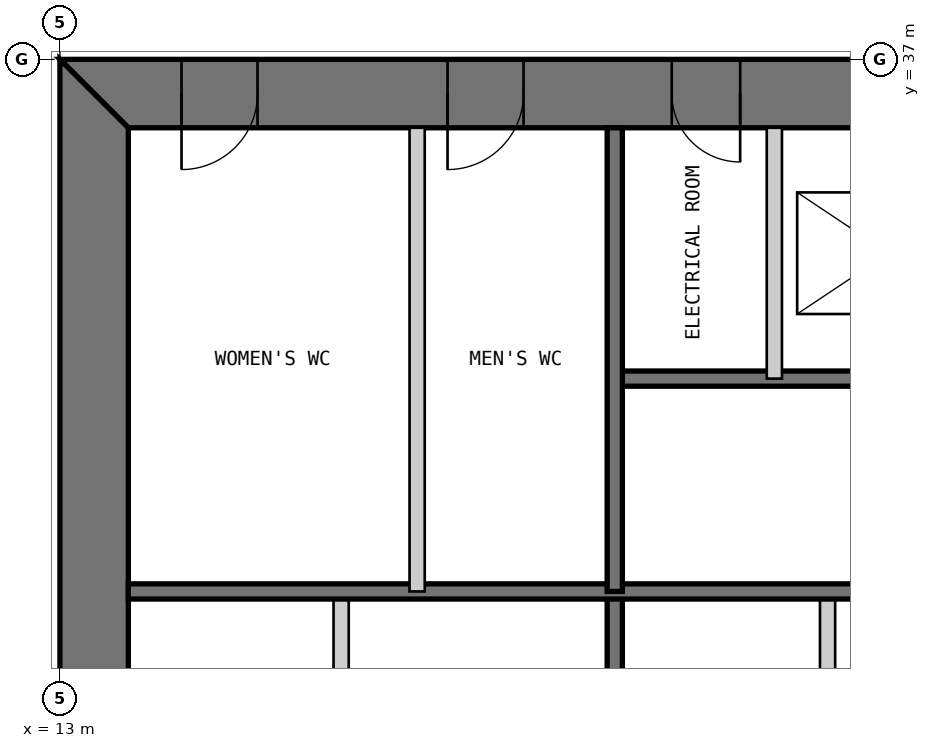
"""IFC4 building model, lengths in metres.
Left out: names, types, materials, properties, quantities, classifications, styles, units other than length and angle.
Written with IfcOpenShell. Run it as: python <this file> out.ifc"""

import sys

from ifc_helpers import new_model, si_unit, direction, frame, frame_2d, origin, place, context, subcontext, project, spatial, polyline, rectangle, outline, extrude, element, fill, save


model = new_model("IFC4")
c1 = context("Model", 3, precision=1e-05, world=origin(), true_north=direction((0.0, 1.0)))
c2 = subcontext(c1, "Body", "Model", "MODEL_VIEW")
j1 = project(units=[si_unit("LENGTHUNIT", "METRE"), si_unit("PLANEANGLEUNIT", "RADIAN")], contexts=[c1])
p1 = place(None, origin())
s1 = spatial("IfcSite", under=j1, at=p1, CompositionType="ELEMENT")
p2 = place(p1, origin())
s2 = spatial("IfcBuilding", under=s1, at=p2, CompositionType="ELEMENT")
p3 = place(p2, frame((0.0, 0.0, 290.0)))
s3 = spatial("IfcBuildingStorey", under=s2, at=p3, CompositionType="ELEMENT", Elevation=290.0)
p4 = place(p3, frame((37.0, 36.55, 0.0), z_axis=(0.0, 0.0, 1.0), x_axis=(-1.0, 0.0, 0.0)))
e1 = element("IfcWall", 1, at=p4, inside=s3, PredefinedType="SHEAR", context=c2, shape_type="SweptSolid", body=[
    extrude(outline(polyline([(0.0, -0.45), (24.0, -0.45), (23.1, 0.45), (0.9, 0.45), (0.0, -0.45)])), origin(), (0.0, 0.0, 1.0), 3.4),
])
p5 = place(p4, frame((4.9, 0.0, 0.0)))
e2 = element("IfcOpeningElement", 2, at=p5, cuts=e1, PredefinedType="OPENING", context=c2, shape_type="SweptSolid", body=[
    extrude(rectangle(XDim=1.0, YDim=2.2, at=frame_2d((0.5, 1.1))), frame((0.0, 0.46, 0.0), z_axis=(0.0, -1.0, 0.0), x_axis=(1.0, 0.0, 0.0)), (0.0, 0.0, 1.0), 0.92),
])
p6 = place(p4, frame((8.9, 0.0, 0.0)))
e3 = element("IfcOpeningElement", 3, at=p6, cuts=e1, PredefinedType="OPENING", context=c2, shape_type="SweptSolid", body=[
    extrude(rectangle(XDim=1.1, YDim=2.2, at=frame_2d((0.55, 1.1))), frame((0.0, 0.46, 0.0), z_axis=(0.0, -1.0, 0.0), x_axis=(1.0, 0.0, 0.0)), (0.0, 0.0, 1.0), 0.92),
])
p7 = place(p4, frame((15.05, 0.0, 0.0)))
e4 = element("IfcOpeningElement", 4, at=p7, cuts=e1, PredefinedType="OPENING", context=c2, shape_type="SweptSolid", body=[
    extrude(rectangle(XDim=0.9, YDim=2.2, at=frame_2d((0.45, 1.1))), frame((0.0, 0.46, 0.0), z_axis=(0.0, -1.0, 0.0), x_axis=(1.0, 0.0, 0.0)), (0.0, 0.0, 1.0), 0.92),
])
p8 = place(p4, frame((17.9, 0.0, 0.0)))
e5 = element("IfcOpeningElement", 5, at=p8, cuts=e1, PredefinedType="OPENING", context=c2, shape_type="SweptSolid", body=[
    extrude(rectangle(XDim=1.0, YDim=2.2, at=frame_2d((0.5, 1.1))), frame((0.0, 0.46, 0.0), z_axis=(0.0, -1.0, 0.0), x_axis=(1.0, 0.0, 0.0)), (0.0, 0.0, 1.0), 0.92),
])
p9 = place(p4, frame((21.4, 0.0, 0.0)))
e6 = element("IfcOpeningElement", 6, at=p9, cuts=e1, PredefinedType="OPENING", context=c2, shape_type="SweptSolid", body=[
    extrude(rectangle(XDim=1.0, YDim=2.2, at=frame_2d((0.5, 1.1))), frame((0.0, 0.46, 0.0), z_axis=(0.0, -1.0, 0.0), x_axis=(1.0, 0.0, 0.0)), (0.0, 0.0, 1.0), 0.92),
])
p10 = place(p3, frame((13.45, 36.1, 0.0), z_axis=(0.0, 0.0, 1.0), x_axis=(0.0, -1.0, 0.0)))
e7 = element("IfcWall", 7, at=p10, inside=s3, PredefinedType="SHEAR", context=c2, shape_type="SweptSolid", body=[
    extrude(outline(polyline([(-0.9, -0.45), (23.1, -0.45), (22.2, 0.45), (0.0, 0.45), (-0.9, -0.45)])), origin(), (0.0, 0.0, 1.0), 3.4),
])
p11 = place(p10, frame((20.2, 0.0, 0.0)))
e8 = element("IfcOpeningElement", 8, at=p11, cuts=e7, PredefinedType="OPENING", context=c2, shape_type="SweptSolid", body=[
    extrude(rectangle(XDim=1.0, YDim=2.2, at=frame_2d((0.5, 1.1))), frame((0.0, 0.46, 0.0), z_axis=(0.0, -1.0, 0.0), x_axis=(1.0, 0.0, 0.0)), (0.0, 0.0, 1.0), 0.92),
])
p12 = place(p10, frame((17.25, 0.0, 0.0)))
e9 = element("IfcOpeningElement", 9, at=p12, cuts=e7, PredefinedType="OPENING", context=c2, shape_type="SweptSolid", body=[
    extrude(rectangle(XDim=0.9, YDim=2.2, at=frame_2d((0.45, 1.1))), frame((0.0, 0.46, 0.0), z_axis=(0.0, -1.0, 0.0), x_axis=(1.0, 0.0, 0.0)), (0.0, 0.0, 1.0), 0.92),
])
p13 = place(p3, frame((16.7, 13.9, 0.0), z_axis=(0.0, 0.0, 1.0), x_axis=(0.0, 1.0, 0.0)))
e10 = element("IfcWall", 10, at=p13, inside=s3, PredefinedType="PARTITIONING", context=c2, shape_type="SweptSolid", body=[
    extrude(rectangle(XDim=16.1, YDim=0.2, at=frame_2d((8.05, 0.0))), origin(), (0.0, 0.0, 1.0), 3.2),
])
p14 = place(p13, frame((7.95, 0.0, 0.0)))
e11 = element("IfcOpeningElement", 11, at=p14, cuts=e10, PredefinedType="OPENING", context=c2, shape_type="SweptSolid", body=[
    extrude(rectangle(XDim=0.9, YDim=2.2, at=frame_2d((0.45, 1.1))), frame((0.0, 0.11, 0.0), z_axis=(0.0, -1.0, 0.0), x_axis=(1.0, 0.0, 0.0)), (0.0, 0.0, 1.0), 0.22),
])
p15 = place(p13, frame((12.9, 0.0, 0.0)))
e12 = element("IfcOpeningElement", 12, at=p15, cuts=e10, PredefinedType="OPENING", context=c2, shape_type="SweptSolid", body=[
    extrude(rectangle(XDim=0.9, YDim=2.2, at=frame_2d((0.45, 1.1))), frame((0.0, 0.11, 0.0), z_axis=(0.0, -1.0, 0.0), x_axis=(1.0, 0.0, 0.0)), (0.0, 0.0, 1.0), 0.22),
])
p16 = place(p3, frame((20.3, 13.9, 0.0), z_axis=(0.0, 0.0, 1.0), x_axis=(0.0, 1.0, 0.0)))
e13 = element("IfcWall", 13, at=p16, inside=s3, PredefinedType="SOLIDWALL", context=c2, shape_type="SweptSolid", body=[
    extrude(rectangle(XDim=16.1, YDim=0.2, at=frame_2d((8.05, 0.0))), origin(), (0.0, 0.0, 1.0), 3.2),
])
p17 = place(p16, frame((10.65, 0.0, 0.0)))
e14 = element("IfcOpeningElement", 14, at=p17, cuts=e13, PredefinedType="OPENING", context=c2, shape_type="SweptSolid", body=[
    extrude(rectangle(XDim=0.9, YDim=2.2, at=frame_2d((0.45, 1.1))), frame((0.0, 0.11, 0.0), z_axis=(0.0, -1.0, 0.0), x_axis=(1.0, 0.0, 0.0)), (0.0, 0.0, 1.0), 0.22),
])
p18 = place(p3, frame((23.1, 20.0, 0.0), z_axis=(0.0, 0.0, 1.0), x_axis=(0.0, 1.0, 0.0)))
e15 = element("IfcWall", 15, at=p18, inside=s3, PredefinedType="PARTITIONING", context=c2, shape_type="SweptSolid", body=[
    extrude(rectangle(XDim=10.0, YDim=0.2, at=frame_2d((5.0, 0.0))), origin(), (0.0, 0.0, 1.0), 3.2),
])
p19 = place(p3, frame((29.7, 32.8, 0.0), z_axis=(0.0, 0.0, 1.0), x_axis=(-1.0, 0.0, 0.0)))
e16 = element("IfcWall", 16, at=p19, inside=s3, PredefinedType="SOLIDWALL", context=c2, shape_type="SweptSolid", body=[
    extrude(rectangle(XDim=9.4, YDim=0.2, at=frame_2d((4.7, 0.0))), origin(), (0.0, 0.0, 1.0), 3.2),
])
p20 = place(p19, frame((0.25, 0.0, 0.0)))
e17 = element("IfcOpeningElement", 17, at=p20, cuts=e16, PredefinedType="OPENING", context=c2, shape_type="SweptSolid", body=[
    extrude(rectangle(XDim=1.0, YDim=2.2, at=frame_2d((0.5, 1.1))), frame((0.0, 0.11, 0.0), z_axis=(0.0, -1.0, 0.0), x_axis=(1.0, 0.0, 0.0)), (0.0, 0.0, 1.0), 0.22),
])
p21 = place(p3, frame((29.7, 30.0, 0.0), z_axis=(0.0, 0.0, 1.0), x_axis=(-1.0, 0.0, 0.0)))
e18 = element("IfcWall", 18, at=p21, inside=s3, PredefinedType="SOLIDWALL", context=c2, shape_type="SweptSolid", body=[
    extrude(rectangle(XDim=15.8, YDim=0.2, at=frame_2d((7.9, 0.0))), origin(), (0.0, 0.0, 1.0), 3.2),
])
p22 = place(p3, frame((22.4, 36.1, 0.0), z_axis=(0.0, 0.0, 1.0), x_axis=(0.0, -1.0, 0.0)))
e19 = element("IfcWall", 19, at=p22, inside=s3, PredefinedType="PARTITIONING", context=c2, shape_type="SweptSolid", body=[
    extrude(rectangle(XDim=3.3, YDim=0.2, at=frame_2d((1.65, 0.0))), origin(), (0.0, 0.0, 1.0), 3.2),
])
p23 = place(p3, frame((20.3, 36.1, 0.0), z_axis=(0.0, 0.0, 1.0), x_axis=(0.0, -1.0, 0.0)))
e20 = element("IfcWall", 20, at=p23, inside=s3, PredefinedType="SOLIDWALL", context=c2, shape_type="SweptSolid", body=[
    extrude(rectangle(XDim=6.1, YDim=0.2, at=frame_2d((3.05, 0.0))), origin(), (0.0, 0.0, 1.0), 3.2),
])
p24 = place(p3, frame((17.7, 36.1, 0.0), z_axis=(0.0, 0.0, 1.0), x_axis=(0.0, -1.0, 0.0)))
e21 = element("IfcWall", 21, at=p24, inside=s3, PredefinedType="PARTITIONING", context=c2, shape_type="SweptSolid", body=[
    extrude(rectangle(XDim=6.1, YDim=0.2, at=frame_2d((3.05, 0.0))), origin(), (0.0, 0.0, 1.0), 3.2),
])
p25 = place(p7, origin())
e22 = element("IfcDoor", 22, at=p25, inside=s3, OperationType="SINGLE_SWING_LEFT", PredefinedType="DOOR", context=c2, shape_type="SweptSolid", body=[
    extrude(rectangle(XDim=0.9, YDim=2.2, at=frame_2d((0.45, 1.1))), frame((0.0, 0.025, 0.0), z_axis=(0.0, -1.0, 0.0), x_axis=(1.0, 0.0, 0.0)), (0.0, 0.0, 1.0), 0.05),
    extrude(outline(polyline([(0.0, 0.0), (0.04, 0.0), (0.04, 2.16), (0.86, 2.16), (0.86, 0.0), (0.9, 0.0), (0.9, 2.2), (0.0, 2.2), (0.0, 0.0)])), frame((0.0, 0.3, 0.0), z_axis=(0.0, -1.0, 0.0), x_axis=(1.0, 0.0, 0.0)), (0.0, 0.0, 1.0), 0.6),
])
fill(e4, e22)
p26 = place(p8, origin())
e23 = element("IfcDoor", 23, at=p26, inside=s3, OperationType="SINGLE_SWING_RIGHT", PredefinedType="DOOR", context=c2, shape_type="SweptSolid", body=[
    extrude(rectangle(XDim=1.0, YDim=2.2, at=frame_2d((0.5, 1.1))), frame((0.0, 0.025, 0.0), z_axis=(0.0, -1.0, 0.0), x_axis=(1.0, 0.0, 0.0)), (0.0, 0.0, 1.0), 0.05),
    extrude(outline(polyline([(0.0, 0.0), (0.04, 0.0), (0.04, 2.16), (0.96, 2.16), (0.96, 0.0), (1.0, 0.0), (1.0, 2.2), (0.0, 2.2), (0.0, 0.0)])), frame((0.0, 0.3, 0.0), z_axis=(0.0, -1.0, 0.0), x_axis=(1.0, 0.0, 0.0)), (0.0, 0.0, 1.0), 0.6),
])
fill(e5, e23)
p27 = place(p9, origin())
e24 = element("IfcDoor", 24, at=p27, inside=s3, OperationType="SINGLE_SWING_RIGHT", PredefinedType="DOOR", context=c2, shape_type="SweptSolid", body=[
    extrude(rectangle(XDim=1.0, YDim=2.2, at=frame_2d((0.5, 1.1))), frame((0.0, 0.025, 0.0), z_axis=(0.0, -1.0, 0.0), x_axis=(1.0, 0.0, 0.0)), (0.0, 0.0, 1.0), 0.05),
    extrude(outline(polyline([(0.0, 0.0), (0.04, 0.0), (0.04, 2.16), (0.96, 2.16), (0.96, 0.0), (1.0, 0.0), (1.0, 2.2), (0.0, 2.2), (0.0, 0.0)])), frame((0.0, 0.3, 0.0), z_axis=(0.0, -1.0, 0.0), x_axis=(1.0, 0.0, 0.0)), (0.0, 0.0, 1.0), 0.6),
])
fill(e6, e24)
save(model, sys.argv[1])
